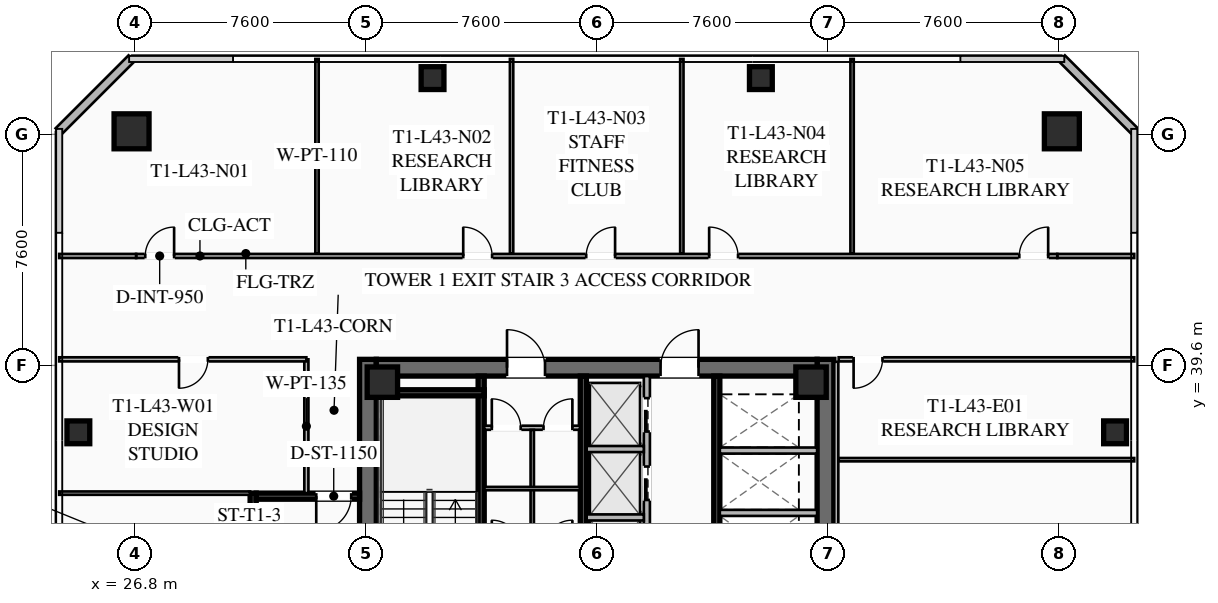
"""IFC4 building model, lengths in metres.
Left out: names, types, materials, properties, quantities, classifications, styles, units other than length and angle.
Written with IfcOpenShell. Run it as: python <this file> out.ifc"""

import sys

from ifc_helpers import new_model, si_unit, direction, frame, frame_2d, origin, origin_2d, place, context, subcontext, project, spatial, rectangle, hollow_rectangle, extrude, element, fill, save


model = new_model("IFC4")
c1 = context("Model", 3, precision=1e-05, world=origin(), true_north=direction((0.0, 1.0)))
c2 = subcontext(c1, "Body", "Model", "MODEL_VIEW")
j1 = project(units=[si_unit("LENGTHUNIT", "METRE"), si_unit("PLANEANGLEUNIT", "RADIAN")], contexts=[c1])
p1 = place(None, origin())
s1 = spatial("IfcSite", under=j1, at=p1, CompositionType="ELEMENT")
p2 = place(p1, origin())
s2 = spatial("IfcBuilding", under=s1, at=p2, CompositionType="ELEMENT")
p3 = place(p2, frame((0.0, 0.0, 160.55)))
s3 = spatial("IfcBuildingStorey", under=s2, at=p3, CompositionType="ELEMENT", Elevation=160.55)
for number, where, z_axis, x_axis in (
    (1, (34.475, 24.2, 0.0), (0.0, 0.0, 1.0), (0.0, 1.0, 0.0)),
    (2, (49.525, 39.8, 0.0), (0.0, 0.0, 1.0), (0.0, -1.0, 0.0)),
):
    element("IfcWall", number, at=place(p3, frame(where, z_axis=z_axis, x_axis=x_axis)), inside=s3, PredefinedType="SHEAR", context=c2, shape_type="SweptSolid", body=[
        extrude(rectangle(XDim=15.6, YDim=0.55, at=frame_2d((7.8, 0.0))), origin(), (0.0, 0.0, 1.0), 3.55),
    ])
p4 = place(p3, frame((34.75, 39.525, 0.0), z_axis=(0.0, 0.0, 1.0), x_axis=(1.0, 0.0, 0.0)))
e3 = element("IfcWall", 3, at=p4, inside=s3, PredefinedType="SHEAR", context=c2, shape_type="SweptSolid", body=[
    extrude(rectangle(XDim=14.5, YDim=0.55, at=frame_2d((7.25, 0.0))), origin(), (0.0, 0.0, 1.0), 3.55),
])
p5 = place(p4, frame((4.3, 0.0, 0.0)))
e4 = element("IfcOpeningElement", 4, at=p5, cuts=e3, PredefinedType="OPENING", context=c2, shape_type="SweptSolid", body=[
    extrude(rectangle(XDim=1.25, YDim=2.25, at=frame_2d((0.625, 1.125))), frame((0.0, 0.285, 0.0), z_axis=(0.0, -1.0, 0.0), x_axis=(1.0, 0.0, 0.0)), (0.0, 0.0, 1.0), 0.57),
])
p6 = place(p4, frame((9.35, 0.0, 0.0)))
e5 = element("IfcOpeningElement", 5, at=p6, cuts=e3, PredefinedType="OPENING", context=c2, shape_type="SweptSolid", body=[
    extrude(rectangle(XDim=1.25, YDim=2.25, at=frame_2d((0.625, 1.125))), frame((0.0, 0.285, 0.0), z_axis=(0.0, -1.0, 0.0), x_axis=(1.0, 0.0, 0.0)), (0.0, 0.0, 1.0), 0.57),
])
for number, where, z_axis, x_axis in (
    (6, (49.05, 39.05, 0.0), (0.0, 0.0, 1.0), (1.0, 0.0, 0.0)),
    (7, (34.95, 39.05, 0.0), (0.0, 0.0, 1.0), (1.0, 0.0, 0.0)),
):
    element("IfcColumn", number, at=place(p3, frame(where, z_axis=z_axis, x_axis=x_axis)), inside=s3, PredefinedType="COLUMN", context=c2, shape_type="SweptSolid", body=[
        extrude(hollow_rectangle(XDim=1.0, YDim=1.0, WallThickness=0.04, at=origin_2d()), origin(), (0.0, 0.0, 1.0), 3.37),
    ])
for number, where, z_axis, x_axis in (
    (8, (57.3, 47.3, 0.0), (0.0, 0.0, 1.0), (1.0, 0.0, 0.0)),
    (9, (26.7, 47.3, 0.0), (0.0, 0.0, 1.0), (1.0, 0.0, 0.0)),
):
    element("IfcColumn", number, at=place(p3, frame(where, z_axis=z_axis, x_axis=x_axis)), inside=s3, PredefinedType="COLUMN", context=c2, shape_type="SweptSolid", body=[
        extrude(hollow_rectangle(XDim=1.15, YDim=1.15, WallThickness=0.045, at=origin_2d()), origin(), (0.0, 0.0, 1.0), 3.37),
    ])
for number, where, z_axis, x_axis in (
    (10, (59.05, 37.4, 0.0), (0.0, 0.0, 1.0), (1.0, 0.0, 0.0)),
    (11, (47.4, 49.05, 0.0), (0.0, 0.0, 1.0), (1.0, 0.0, 0.0)),
    (12, (36.6, 49.05, 0.0), (0.0, 0.0, 1.0), (1.0, 0.0, 0.0)),
    (13, (24.95, 37.4, 0.0), (0.0, 0.0, 1.0), (1.0, 0.0, 0.0)),
):
    element("IfcColumn", number, at=place(p3, frame(where, z_axis=z_axis, x_axis=x_axis)), inside=s3, PredefinedType="COLUMN", context=c2, shape_type="SweptSolid", body=[
        extrude(hollow_rectangle(XDim=0.75, YDim=0.75, WallThickness=0.032, at=origin_2d()), origin(), (0.0, 0.0, 1.0), 3.37),
    ])
for number, where, z_axis, x_axis in (
    (14, (24.3, 47.3, 0.0), (0.0, 0.0, 1.0), (0.707, 0.707, 0.0)),
    (15, (57.3, 49.7, 0.0), (0.0, 0.0, 1.0), (0.707, -0.707, 0.0)),
):
    element("IfcWall", number, at=place(p3, frame(where, z_axis=z_axis, x_axis=x_axis)), inside=s3, PredefinedType="SOLIDWALL", context=c2, shape_type="SweptSolid", body=[
        extrude(rectangle(XDim=3.394, YDim=0.28, at=frame_2d((1.697, 0.0))), origin(), (0.0, 0.0, 1.0), 3.37),
    ])
p7 = place(p3, frame((38.2, 31.2, 0.0), z_axis=(0.0, 0.0, 1.0), x_axis=(0.0, 1.0, 0.0)))
e16 = element("IfcWall", 16, at=p7, inside=s3, PredefinedType="SHEAR", context=c2, shape_type="SweptSolid", body=[
    extrude(rectangle(XDim=8.05, YDim=0.2, at=frame_2d((4.025, 0.0))), origin(), (0.0, 0.0, 1.0), 3.37),
])
p8 = place(p7, frame((0.45, 0.0, 0.0)))
e17 = element("IfcOpeningElement", 17, at=p8, cuts=e16, PredefinedType="OPENING", context=c2, shape_type="SweptSolid", body=[
    extrude(rectangle(XDim=1.15, YDim=2.2, at=frame_2d((0.575, 1.1))), frame((0.0, 0.11, 0.0), z_axis=(0.0, -1.0, 0.0), x_axis=(1.0, 0.0, 0.0)), (0.0, 0.0, 1.0), 0.22),
])
p9 = place(p3, frame((34.75, 38.7, 0.0), z_axis=(0.0, 0.0, 1.0), x_axis=(1.0, 0.0, 0.0)))
e18 = element("IfcWall", 18, at=p9, inside=s3, PredefinedType="SHEAR", context=c2, shape_type="SweptSolid", body=[
    extrude(rectangle(XDim=3.55, YDim=0.2, at=frame_2d((1.775, 0.0))), origin(), (0.0, 0.0, 1.0), 3.37),
])
p10 = place(p3, frame((41.56, 24.75, 0.0), z_axis=(0.0, 0.0, 1.0), x_axis=(0.0, 1.0, 0.0)))
e19 = element("IfcWall", 19, at=p10, inside=s3, PredefinedType="SHEAR", context=c2, shape_type="SweptSolid", body=[
    extrude(rectangle(XDim=14.5, YDim=0.2, at=frame_2d((7.25, 0.0))), origin(), (0.0, 0.0, 1.0), 3.37),
])
p11 = place(p3, frame((45.95, 39.25, 0.0), z_axis=(0.0, 0.0, 1.0), x_axis=(0.0, -1.0, 0.0)))
e20 = element("IfcWall", 20, at=p11, inside=s3, PredefinedType="SHEAR", context=c2, shape_type="SweptSolid", body=[
    extrude(rectangle(XDim=6.45, YDim=0.2, at=frame_2d((3.225, 0.0))), origin(), (0.0, 0.0, 1.0), 3.37),
])
for number, where, z_axis, x_axis in (
    (21, (46.05, 34.75, 0.0), (0.0, 0.0, 1.0), (1.0, 0.0, 0.0)),
    (22, (46.05, 36.8, 0.0), (0.0, 0.0, 1.0), (1.0, 0.0, 0.0)),
):
    element("IfcWall", number, at=place(p3, frame(where, z_axis=z_axis, x_axis=x_axis)), inside=s3, PredefinedType="SOLIDWALL", context=c2, shape_type="SweptSolid", body=[
        extrude(rectangle(XDim=3.2, YDim=0.2, at=frame_2d((1.6, 0.0))), origin(), (0.0, 0.0, 1.0), 3.37),
    ])
p12 = place(p3, frame((38.3, 37.55, 0.0), z_axis=(0.0, 0.0, 1.0), x_axis=(1.0, 0.0, 0.0)))
e23 = element("IfcWall", 23, at=p12, inside=s3, PredefinedType="PARTITIONING", context=c2, shape_type="SweptSolid", body=[
    extrude(rectangle(XDim=3.15, YDim=0.135, at=frame_2d((1.575, 0.0))), origin(), (0.0, 0.0, 1.0), 2.723),
])
p13 = place(p12, frame((0.25, 0.0, 0.0)))
e24 = element("IfcOpeningElement", 24, at=p13, cuts=e23, PredefinedType="OPENING", context=c2, shape_type="SweptSolid", body=[
    extrude(rectangle(XDim=0.95, YDim=2.05, at=frame_2d((0.475, 1.025))), frame((0.0, 0.077, 0.0), z_axis=(0.0, -1.0, 0.0), x_axis=(1.0, 0.0, 0.0)), (0.0, 0.0, 1.0), 0.155),
])
p14 = place(p12, frame((1.95, 0.0, 0.0)))
e25 = element("IfcOpeningElement", 25, at=p14, cuts=e23, PredefinedType="OPENING", context=c2, shape_type="SweptSolid", body=[
    extrude(rectangle(XDim=0.95, YDim=2.05, at=frame_2d((0.475, 1.025))), frame((0.0, 0.077, 0.0), z_axis=(0.0, -1.0, 0.0), x_axis=(1.0, 0.0, 0.0)), (0.0, 0.0, 1.0), 0.155),
])
p15 = place(p3, frame((39.88, 33.68, 0.0), z_axis=(0.0, 0.0, 1.0), x_axis=(0.0, 1.0, 0.0)))
e26 = element("IfcWall", 26, at=p15, inside=s3, PredefinedType="PARTITIONING", context=c2, shape_type="SweptSolid", body=[
    extrude(rectangle(XDim=3.8, YDim=0.11, at=frame_2d((1.9, 0.0))), origin(), (0.0, 0.0, 1.0), 2.723),
])
p16 = place(p3, frame((38.3, 35.55, 0.0), z_axis=(0.0, 0.0, 1.0), x_axis=(1.0, 0.0, 0.0)))
e27 = element("IfcWall", 27, at=p16, inside=s3, PredefinedType="PARTITIONING", context=c2, shape_type="SweptSolid", body=[
    extrude(rectangle(XDim=3.15, YDim=0.11, at=frame_2d((1.575, 0.0))), origin(), (0.0, 0.0, 1.0), 2.723),
])
p17 = place(p3, frame((43.65, 32.35, 0.0), z_axis=(0.0, 0.0, 1.0), x_axis=(0.0, 1.0, 0.0)))
e28 = element("IfcWall", 28, at=p17, inside=s3, PredefinedType="SOLIDWALL", context=c2, shape_type="SweptSolid", body=[
    extrude(rectangle(XDim=6.9, YDim=0.2, at=frame_2d((3.45, 0.0))), origin(), (0.0, 0.0, 1.0), 3.37),
])
p18 = place(p17, frame((0.575, 0.0, 0.0)))
e29 = element("IfcOpeningElement", 29, at=p18, cuts=e28, PredefinedType="OPENING", context=c2, shape_type="SweptSolid", body=[
    extrude(rectangle(XDim=1.1, YDim=2.2, at=frame_2d((0.55, 1.1))), frame((0.0, 0.11, 0.0), z_axis=(0.0, -1.0, 0.0), x_axis=(1.0, 0.0, 0.0)), (0.0, 0.0, 1.0), 0.22),
])
p19 = place(p17, frame((2.825, 0.0, 0.0)))
e30 = element("IfcOpeningElement", 30, at=p19, cuts=e28, PredefinedType="OPENING", context=c2, shape_type="SweptSolid", body=[
    extrude(rectangle(XDim=1.1, YDim=2.2, at=frame_2d((0.55, 1.1))), frame((0.0, 0.11, 0.0), z_axis=(0.0, -1.0, 0.0), x_axis=(1.0, 0.0, 0.0)), (0.0, 0.0, 1.0), 0.22),
])
p20 = place(p17, frame((5.075, 0.0, 0.0)))
e31 = element("IfcOpeningElement", 31, at=p20, cuts=e28, PredefinedType="OPENING", context=c2, shape_type="SweptSolid", body=[
    extrude(rectangle(XDim=1.1, YDim=2.2, at=frame_2d((0.55, 1.1))), frame((0.0, 0.11, 0.0), z_axis=(0.0, -1.0, 0.0), x_axis=(1.0, 0.0, 0.0)), (0.0, 0.0, 1.0), 0.22),
])
for number, where, z_axis, x_axis in (
    (32, (41.67, 34.6, 0.0), (0.0, 0.0, 1.0), (1.0, 0.0, 0.0)),
    (33, (41.67, 36.85, 0.0), (0.0, 0.0, 1.0), (1.0, 0.0, 0.0)),
):
    element("IfcWall", number, at=place(p3, frame(where, z_axis=z_axis, x_axis=x_axis)), inside=s3, PredefinedType="SOLIDWALL", context=c2, shape_type="SweptSolid", body=[
        extrude(rectangle(XDim=1.88, YDim=0.2, at=frame_2d((0.94, 0.0))), origin(), (0.0, 0.0, 1.0), 3.37),
    ])
p21 = place(p3, frame((30.7, 28.6, 0.0), z_axis=(0.0, 0.0, 1.0), x_axis=(0.0, 1.0, 0.0)))
e34 = element("IfcWall", 34, at=p21, inside=s3, PredefinedType="SHEAR", context=c2, shape_type="SweptSolid", body=[
    extrude(rectangle(XDim=6.8, YDim=0.2, at=frame_2d((3.4, 0.0))), origin(), (0.0, 0.0, 1.0), 3.37),
])
p22 = place(p3, frame((34.2, 35.3, 0.0), z_axis=(0.0, 0.0, 1.0), x_axis=(-1.0, 0.0, 0.0)))
e35 = element("IfcWall", 35, at=p22, inside=s3, PredefinedType="SHEAR", context=c2, shape_type="SweptSolid", body=[
    extrude(rectangle(XDim=3.4, YDim=0.2, at=frame_2d((1.7, 0.0))), origin(), (0.0, 0.0, 1.0), 3.37),
])
p23 = place(p22, frame((0.275, 0.0, 0.0)))
e36 = element("IfcOpeningElement", 36, at=p23, cuts=e35, PredefinedType="OPENING", context=c2, shape_type="SweptSolid", body=[
    extrude(rectangle(XDim=1.15, YDim=2.2, at=frame_2d((0.575, 1.1))), frame((0.0, 0.11, 0.0), z_axis=(0.0, -1.0, 0.0), x_axis=(1.0, 0.0, 0.0)), (0.0, 0.0, 1.0), 0.22),
])
p24 = place(p3, frame((32.45, 35.4, 0.0), z_axis=(0.0, 0.0, 1.0), x_axis=(0.0, 1.0, 0.0)))
e37 = element("IfcWall", 37, at=p24, inside=s3, PredefinedType="PARTITIONING", context=c2, shape_type="SweptSolid", body=[
    extrude(rectangle(XDim=4.4, YDim=0.135, at=frame_2d((2.2, 0.0))), origin(), (0.0, 0.0, 1.0), 2.723),
])
p25 = place(p3, frame((26.85, 43.2, 0.0), z_axis=(0.0, 0.0, 1.0), x_axis=(1.0, 0.0, 0.0)))
e38 = element("IfcWall", 38, at=p25, inside=s3, PredefinedType="PARTITIONING", context=c2, shape_type="SweptSolid", body=[
    extrude(rectangle(XDim=30.3, YDim=0.135, at=frame_2d((15.15, 0.0))), origin(), (0.0, 0.0, 1.0), 2.723),
])
p26 = place(p25, frame((0.3, 0.0, 0.0)))
e39 = element("IfcOpeningElement", 39, at=p26, cuts=e38, PredefinedType="OPENING", context=c2, shape_type="SweptSolid", body=[
    extrude(rectangle(XDim=0.95, YDim=2.05, at=frame_2d((0.475, 1.025))), frame((0.0, 0.077, 0.0), z_axis=(0.0, -1.0, 0.0), x_axis=(1.0, 0.0, 0.0)), (0.0, 0.0, 1.0), 0.155),
])
p27 = place(p25, frame((10.76, 0.0, 0.0)))
e40 = element("IfcOpeningElement", 40, at=p27, cuts=e38, PredefinedType="OPENING", context=c2, shape_type="SweptSolid", body=[
    extrude(rectangle(XDim=0.95, YDim=2.05, at=frame_2d((0.475, 1.025))), frame((0.0, 0.077, 0.0), z_axis=(0.0, -1.0, 0.0), x_axis=(1.0, 0.0, 0.0)), (0.0, 0.0, 1.0), 0.155),
])
p28 = place(p25, frame((14.805, 0.0, 0.0)))
e41 = element("IfcOpeningElement", 41, at=p28, cuts=e38, PredefinedType="OPENING", context=c2, shape_type="SweptSolid", body=[
    extrude(rectangle(XDim=0.95, YDim=2.05, at=frame_2d((0.475, 1.025))), frame((0.0, 0.077, 0.0), z_axis=(0.0, -1.0, 0.0), x_axis=(1.0, 0.0, 0.0)), (0.0, 0.0, 1.0), 0.155),
])
p29 = place(p25, frame((18.849, 0.0, 0.0)))
e42 = element("IfcOpeningElement", 42, at=p29, cuts=e38, PredefinedType="OPENING", context=c2, shape_type="SweptSolid", body=[
    extrude(rectangle(XDim=0.95, YDim=2.05, at=frame_2d((0.475, 1.025))), frame((0.0, 0.077, 0.0), z_axis=(0.0, -1.0, 0.0), x_axis=(1.0, 0.0, 0.0)), (0.0, 0.0, 1.0), 0.155),
])
p30 = place(p25, frame((29.05, 0.0, 0.0)))
e43 = element("IfcOpeningElement", 43, at=p30, cuts=e38, PredefinedType="OPENING", context=c2, shape_type="SweptSolid", body=[
    extrude(rectangle(XDim=0.95, YDim=2.05, at=frame_2d((0.475, 1.025))), frame((0.0, 0.077, 0.0), z_axis=(0.0, -1.0, 0.0), x_axis=(1.0, 0.0, 0.0)), (0.0, 0.0, 1.0), 0.155),
])
for number, where, z_axis, x_axis in (
    (44, (24.32, 43.2, 0.0), (0.0, 0.0, 1.0), (1.0, 0.0, 0.0)),
    (45, (57.15, 43.2, 0.0), (0.0, 0.0, 1.0), (1.0, 0.0, 0.0)),
):
    element("IfcWall", number, at=place(p3, frame(where, z_axis=z_axis, x_axis=x_axis)), inside=s3, PredefinedType="PARTITIONING", context=c2, shape_type="SweptSolid", body=[
        extrude(rectangle(XDim=2.53, YDim=0.135, at=frame_2d((1.265, 0.0))), origin(), (0.0, 0.0, 1.0), 2.723),
    ])
for number, where, z_axis, x_axis in (
    (46, (32.8, 43.28, 0.0), (0.0, 0.0, 1.0), (0.0, 1.0, 0.0)),
    (47, (39.2, 43.28, 0.0), (0.0, 0.0, 1.0), (0.0, 1.0, 0.0)),
    (48, (44.8, 43.28, 0.0), (0.0, 0.0, 1.0), (0.0, 1.0, 0.0)),
    (49, (50.4, 43.28, 0.0), (0.0, 0.0, 1.0), (0.0, 1.0, 0.0)),
):
    element("IfcWall", number, at=place(p3, frame(where, z_axis=z_axis, x_axis=x_axis)), inside=s3, PredefinedType="PARTITIONING", context=c2, shape_type="SweptSolid", body=[
        extrude(rectangle(XDim=6.4, YDim=0.11, at=frame_2d((3.2, 0.0))), origin(), (0.0, 0.0, 1.0), 2.723),
    ])
p31 = place(p3, frame((49.88, 39.72, 0.0), z_axis=(0.0, 0.0, 1.0), x_axis=(0.0, -1.0, 0.0)))
e50 = element("IfcWall", 50, at=p31, inside=s3, PredefinedType="PARTITIONING", context=c2, shape_type="SweptSolid", body=[
    extrude(rectangle(XDim=15.44, YDim=0.135, at=frame_2d((7.72, 0.0))), origin(), (0.0, 0.0, 1.0), 2.723),
])
p32 = place(p3, frame((59.68, 39.8, 0.0), z_axis=(0.0, 0.0, 1.0), x_axis=(-1.0, 0.0, 0.0)))
e51 = element("IfcWall", 51, at=p32, inside=s3, PredefinedType="PARTITIONING", context=c2, shape_type="SweptSolid", body=[
    extrude(rectangle(XDim=9.72, YDim=0.135, at=frame_2d((4.86, 0.0))), origin(), (0.0, 0.0, 1.0), 2.723),
])
p33 = place(p32, frame((8.28, 0.0, 0.0)))
e52 = element("IfcOpeningElement", 52, at=p33, cuts=e51, PredefinedType="OPENING", context=c2, shape_type="SweptSolid", body=[
    extrude(rectangle(XDim=0.95, YDim=2.05, at=frame_2d((0.475, 1.025))), frame((0.0, 0.077, 0.0), z_axis=(0.0, -1.0, 0.0), x_axis=(1.0, 0.0, 0.0)), (0.0, 0.0, 1.0), 0.155),
])
p34 = place(p3, frame((49.96, 36.5, 0.0), z_axis=(0.0, 0.0, 1.0), x_axis=(1.0, 0.0, 0.0)))
e53 = element("IfcWall", 53, at=p34, inside=s3, PredefinedType="PARTITIONING", context=c2, shape_type="SweptSolid", body=[
    extrude(rectangle(XDim=9.72, YDim=0.11, at=frame_2d((4.86, 0.0))), origin(), (0.0, 0.0, 1.0), 2.723),
])
p35 = place(p3, frame((32.45, 39.8, 0.0), z_axis=(0.0, 0.0, 1.0), x_axis=(-1.0, 0.0, 0.0)))
e54 = element("IfcWall", 54, at=p35, inside=s3, PredefinedType="PARTITIONING", context=c2, shape_type="SweptSolid", body=[
    extrude(rectangle(XDim=8.13, YDim=0.135, at=frame_2d((4.065, 0.0))), origin(), (0.0, 0.0, 1.0), 2.723),
])
p36 = place(p35, frame((3.24, 0.0, 0.0)))
e55 = element("IfcOpeningElement", 55, at=p36, cuts=e54, PredefinedType="OPENING", context=c2, shape_type="SweptSolid", body=[
    extrude(rectangle(XDim=0.95, YDim=2.05, at=frame_2d((0.475, 1.025))), frame((0.0, 0.077, 0.0), z_axis=(0.0, -1.0, 0.0), x_axis=(1.0, 0.0, 0.0)), (0.0, 0.0, 1.0), 0.155),
])
p37 = place(p3, frame((30.6, 35.4, 0.0), z_axis=(0.0, 0.0, 1.0), x_axis=(-1.0, 0.0, 0.0)))
e56 = element("IfcWall", 56, at=p37, inside=s3, PredefinedType="PARTITIONING", context=c2, shape_type="SweptSolid", body=[
    extrude(rectangle(XDim=6.28, YDim=0.11, at=frame_2d((3.14, 0.0))), origin(), (0.0, 0.0, 1.0), 2.723),
])
p38 = place(p5, origin())
e57 = element("IfcDoor", 57, at=p38, inside=s3, OperationType="SINGLE_SWING_LEFT", PredefinedType="DOOR", context=c2, shape_type="SweptSolid", body=[
    extrude(rectangle(XDim=1.25, YDim=2.25, at=frame_2d((0.625, 1.125))), frame((0.0, 0.025, 0.0), z_axis=(0.0, -1.0, 0.0), x_axis=(1.0, 0.0, 0.0)), (0.0, 0.0, 1.0), 0.05),
])
fill(e4, e57)
p39 = place(p6, origin())
e58 = element("IfcDoor", 58, at=p39, inside=s3, OperationType="SINGLE_SWING_RIGHT", PredefinedType="DOOR", context=c2, shape_type="SweptSolid", body=[
    extrude(rectangle(XDim=1.25, YDim=2.25, at=frame_2d((0.625, 1.125))), frame((0.0, 0.025, 0.0), z_axis=(0.0, -1.0, 0.0), x_axis=(1.0, 0.0, 0.0)), (0.0, 0.0, 1.0), 0.05),
])
fill(e5, e58)
p40 = place(p13, origin())
e59 = element("IfcDoor", 59, at=p40, inside=s3, OperationType="SINGLE_SWING_LEFT", PredefinedType="DOOR", context=c2, shape_type="SweptSolid", body=[
    extrude(rectangle(XDim=0.95, YDim=2.05, at=frame_2d((0.475, 1.025))), frame((0.0, 0.025, 0.0), z_axis=(0.0, -1.0, 0.0), x_axis=(1.0, 0.0, 0.0)), (0.0, 0.0, 1.0), 0.05),
])
fill(e24, e59)
p41 = place(p14, origin())
e60 = element("IfcDoor", 60, at=p41, inside=s3, OperationType="SINGLE_SWING_RIGHT", PredefinedType="DOOR", context=c2, shape_type="SweptSolid", body=[
    extrude(rectangle(XDim=0.95, YDim=2.05, at=frame_2d((0.475, 1.025))), frame((0.0, 0.025, 0.0), z_axis=(0.0, -1.0, 0.0), x_axis=(1.0, 0.0, 0.0)), (0.0, 0.0, 1.0), 0.05),
])
fill(e25, e60)
p42 = place(p23, origin())
e61 = element("IfcDoor", 61, at=p42, inside=s3, OperationType="SINGLE_SWING_RIGHT", PredefinedType="DOOR", context=c2, shape_type="SweptSolid", body=[
    extrude(rectangle(XDim=1.15, YDim=2.2, at=frame_2d((0.575, 1.1))), frame((0.0, 0.025, 0.0), z_axis=(0.0, -1.0, 0.0), x_axis=(1.0, 0.0, 0.0)), (0.0, 0.0, 1.0), 0.05),
])
fill(e36, e61)
p43 = place(p26, origin())
e62 = element("IfcDoor", 62, at=p43, inside=s3, OperationType="SINGLE_SWING_RIGHT", PredefinedType="DOOR", context=c2, shape_type="SweptSolid", body=[
    extrude(rectangle(XDim=0.95, YDim=2.05, at=frame_2d((0.475, 1.025))), frame((0.0, 0.025, 0.0), z_axis=(0.0, -1.0, 0.0), x_axis=(1.0, 0.0, 0.0)), (0.0, 0.0, 1.0), 0.05),
])
fill(e39, e62)
p44 = place(p27, origin())
e63 = element("IfcDoor", 63, at=p44, inside=s3, OperationType="SINGLE_SWING_LEFT", PredefinedType="DOOR", context=c2, shape_type="SweptSolid", body=[
    extrude(rectangle(XDim=0.95, YDim=2.05, at=frame_2d((0.475, 1.025))), frame((0.0, 0.025, 0.0), z_axis=(0.0, -1.0, 0.0), x_axis=(1.0, 0.0, 0.0)), (0.0, 0.0, 1.0), 0.05),
])
fill(e40, e63)
p45 = place(p28, origin())
e64 = element("IfcDoor", 64, at=p45, inside=s3, OperationType="SINGLE_SWING_RIGHT", PredefinedType="DOOR", context=c2, shape_type="SweptSolid", body=[
    extrude(rectangle(XDim=0.95, YDim=2.05, at=frame_2d((0.475, 1.025))), frame((0.0, 0.025, 0.0), z_axis=(0.0, -1.0, 0.0), x_axis=(1.0, 0.0, 0.0)), (0.0, 0.0, 1.0), 0.05),
])
fill(e41, e64)
p46 = place(p29, origin())
e65 = element("IfcDoor", 65, at=p46, inside=s3, OperationType="SINGLE_SWING_LEFT", PredefinedType="DOOR", context=c2, shape_type="SweptSolid", body=[
    extrude(rectangle(XDim=0.95, YDim=2.05, at=frame_2d((0.475, 1.025))), frame((0.0, 0.025, 0.0), z_axis=(0.0, -1.0, 0.0), x_axis=(1.0, 0.0, 0.0)), (0.0, 0.0, 1.0), 0.05),
])
fill(e42, e65)
p47 = place(p30, origin())
e66 = element("IfcDoor", 66, at=p47, inside=s3, OperationType="SINGLE_SWING_RIGHT", PredefinedType="DOOR", context=c2, shape_type="SweptSolid", body=[
    extrude(rectangle(XDim=0.95, YDim=2.05, at=frame_2d((0.475, 1.025))), frame((0.0, 0.025, 0.0), z_axis=(0.0, -1.0, 0.0), x_axis=(1.0, 0.0, 0.0)), (0.0, 0.0, 1.0), 0.05),
])
fill(e43, e66)
p48 = place(p33, origin())
e67 = element("IfcDoor", 67, at=p48, inside=s3, OperationType="SINGLE_SWING_RIGHT", PredefinedType="DOOR", context=c2, shape_type="SweptSolid", body=[
    extrude(rectangle(XDim=0.95, YDim=2.05, at=frame_2d((0.475, 1.025))), frame((0.0, 0.025, 0.0), z_axis=(0.0, -1.0, 0.0), x_axis=(1.0, 0.0, 0.0)), (0.0, 0.0, 1.0), 0.05),
])
fill(e52, e67)
p49 = place(p36, origin())
e68 = element("IfcDoor", 68, at=p49, inside=s3, OperationType="SINGLE_SWING_RIGHT", PredefinedType="DOOR", context=c2, shape_type="SweptSolid", body=[
    extrude(rectangle(XDim=0.95, YDim=2.05, at=frame_2d((0.475, 1.025))), frame((0.0, 0.025, 0.0), z_axis=(0.0, -1.0, 0.0), x_axis=(1.0, 0.0, 0.0)), (0.0, 0.0, 1.0), 0.05),
])
fill(e55, e68)
p50 = place(p19, origin())
e69 = element("IfcDoor", 69, at=p50, inside=s3, OperationType="SLIDING_TO_LEFT", PredefinedType="DOOR", context=c2, shape_type="SweptSolid", body=[
    extrude(rectangle(XDim=1.1, YDim=2.2, at=frame_2d((0.55, 1.1))), frame((0.0, 0.025, 0.0), z_axis=(0.0, -1.0, 0.0), x_axis=(1.0, 0.0, 0.0)), (0.0, 0.0, 1.0), 0.05),
])
fill(e30, e69)
p51 = place(p20, origin())
e70 = element("IfcDoor", 70, at=p51, inside=s3, OperationType="SLIDING_TO_LEFT", PredefinedType="DOOR", context=c2, shape_type="SweptSolid", body=[
    extrude(rectangle(XDim=1.1, YDim=2.2, at=frame_2d((0.55, 1.1))), frame((0.0, 0.025, 0.0), z_axis=(0.0, -1.0, 0.0), x_axis=(1.0, 0.0, 0.0)), (0.0, 0.0, 1.0), 0.05),
])
fill(e31, e70)
save(model, sys.argv[1])
